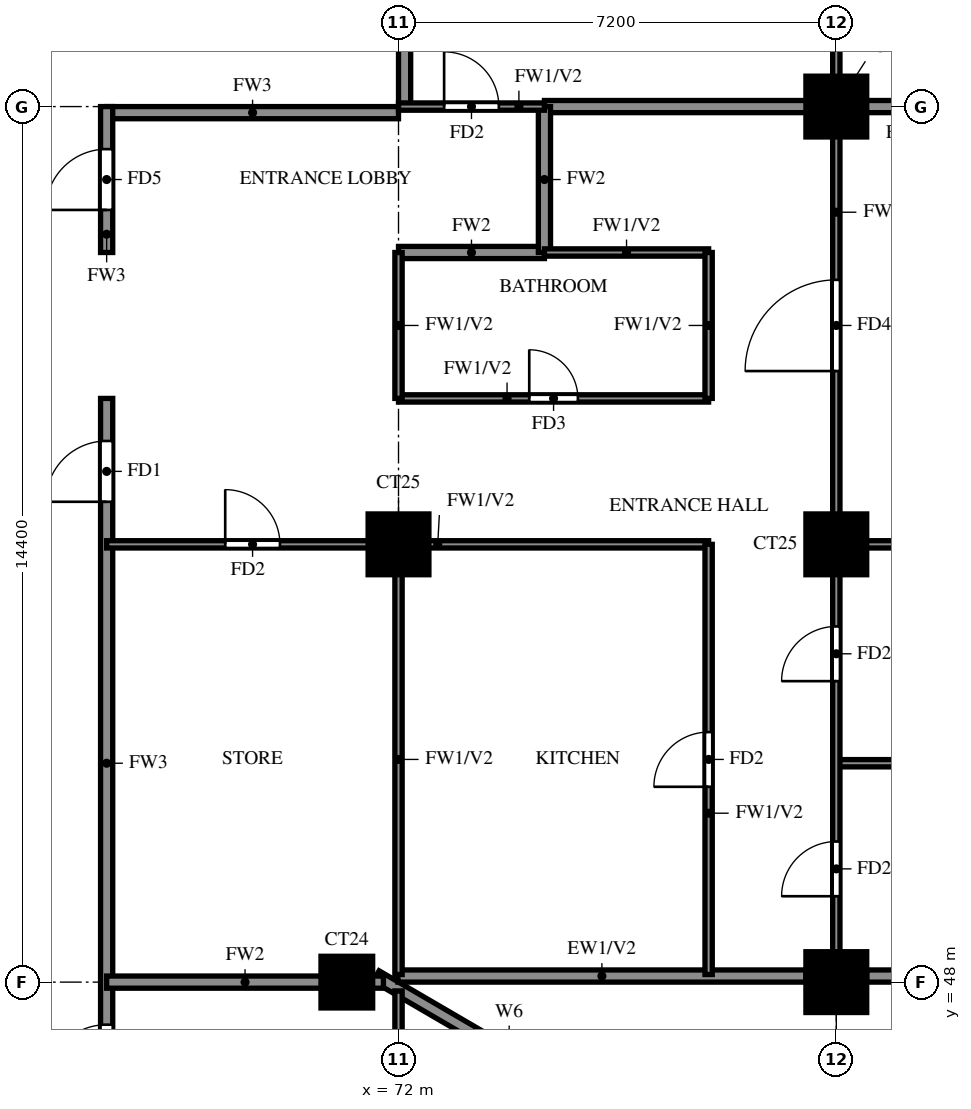
"""IFC4 building model, lengths in metres.
Left out: names, types, materials, properties, quantities, classifications, styles, units other than length and angle.
Written with IfcOpenShell. Run it as: python <this file> out.ifc"""

import sys

from ifc_helpers import new_model, si_unit, direction, frame, frame_2d, origin, origin_2d, place, context, subcontext, project, spatial, rectangle, extrude, source, transform, mapped, element, fill, save


model = new_model("IFC4")
c1 = context("Model", 3, precision=1e-05, world=origin(), true_north=direction((0.0, 1.0)))
c2 = subcontext(c1, "Body", "Model", "MODEL_VIEW")
j1 = project(units=[si_unit("LENGTHUNIT", "METRE"), si_unit("PLANEANGLEUNIT", "RADIAN")], contexts=[c1])
p1 = place(None, origin())
s1 = spatial("IfcSite", under=j1, at=p1, CompositionType="ELEMENT")
p2 = place(p1, origin())
s2 = spatial("IfcBuilding", under=s1, at=p2, CompositionType="ELEMENT")
p3 = place(p2, frame((0.0, 0.0, 160.5)))
s3 = spatial("IfcBuildingStorey", under=s2, at=p3, CompositionType="ELEMENT", Elevation=160.5)
m1 = source(origin(), c2, "Body", "SweptSolid", [
    extrude(rectangle(XDim=0.85, YDim=0.85, at=origin_2d()), origin(), (0.0, 0.0, 1.0), 3.2),
])
p4 = place(p3, frame((71.15, 48.0, 0.0), z_axis=(0.0, 0.0, 1.0), x_axis=(1.0, 0.0, 0.0)))
e1 = element("IfcColumn", 1, at=p4, inside=s3, PredefinedType="COLUMN", context=c2, shape_type="MappedRepresentation", body=[
    mapped(m1, transform((0.0, 0.0, 0.0))),
])
m2 = source(origin(), c2, "Body", "SweptSolid", [
    extrude(rectangle(XDim=1.0, YDim=1.0, at=origin_2d()), origin(), (0.0, 0.0, 1.0), 3.2),
])
for number, where, z_axis, x_axis in (
    (2, (79.2, 48.0, 0.0), (0.0, 0.0, 1.0), (1.0, 0.0, 0.0)),
    (3, (72.0, 55.2, 0.0), (0.0, 0.0, 1.0), (1.0, 0.0, 0.0)),
    (4, (79.2, 55.2, 0.0), (0.0, 0.0, 1.0), (1.0, 0.0, 0.0)),
    (5, (79.2, 62.4, 0.0), (0.0, 0.0, 1.0), (1.0, 0.0, 0.0)),
):
    element("IfcColumn", number, at=place(p3, frame(where, z_axis=z_axis, x_axis=x_axis)), inside=s3, PredefinedType="COLUMN", context=c2, shape_type="MappedRepresentation", body=[
        mapped(m2, transform((0.0, 0.0, 0.0))),
    ])
p5 = place(p3, frame((85.719, 39.881, 0.0), z_axis=(0.0, 0.0, 1.0), x_axis=(-0.86377618652, 0.503875678716, 0.0)))
e6 = element("IfcWall", 6, at=p5, inside=s3, PredefinedType="SOLIDWALL", context=c2, shape_type="SweptSolid", body=[
    extrude(rectangle(XDim=16.311, YDim=0.2, at=frame_2d((8.156, 0.0))), origin(), (0.0, 0.0, 1.0), 3.2),
])
p6 = place(p5, frame((13.326, 0.0, 1.5)))
e7 = element("IfcOpeningElement", 7, at=p6, cuts=e6, PredefinedType="OPENING", context=c2, shape_type="SweptSolid", body=[
    extrude(rectangle(XDim=0.9, YDim=0.9, at=frame_2d((0.45, 0.45))), frame((0.0, 0.11, 0.0), z_axis=(0.0, -1.0, 0.0), x_axis=(1.0, 0.0, 0.0)), (0.0, 0.0, 1.0), 0.22),
])
p7 = place(p3, frame((71.99, 48.1, 0.0), z_axis=(0.0, 0.0, 1.0), x_axis=(1.0, 0.0, 0.0)))
e8 = element("IfcWall", 8, at=p7, inside=s3, PredefinedType="SOLIDWALL", context=c2, shape_type="SweptSolid", body=[
    extrude(rectangle(XDim=6.71, YDim=0.2, at=frame_2d((3.355, 0.0))), origin(), (0.0, 0.0, 1.0), 3.2),
])
p8 = place(p3, frame((79.7, 48.1, 0.0), z_axis=(0.0, 0.0, 1.0), x_axis=(1.0, 0.0, 0.0)))
e9 = element("IfcWall", 9, at=p8, inside=s3, PredefinedType="SOLIDWALL", context=c2, shape_type="SweptSolid", body=[
    extrude(rectangle(XDim=5.675, YDim=0.2, at=frame_2d((2.837, 0.0))), origin(), (0.0, 0.0, 1.0), 3.2),
])
p9 = place(p8, frame((1.637, 0.0, 0.6)))
e10 = element("IfcOpeningElement", 10, at=p9, cuts=e9, PredefinedType="OPENING", context=c2, shape_type="SweptSolid", body=[
    extrude(rectangle(XDim=2.4, YDim=2.4, at=frame_2d((1.2, 1.2))), frame((0.0, 0.11, 0.0), z_axis=(0.0, -1.0, 0.0), x_axis=(1.0, 0.0, 0.0)), (0.0, 0.0, 1.0), 0.22),
])
p10 = place(p3, frame((67.2, 62.3, 0.0), z_axis=(0.0, 0.0, 1.0), x_axis=(1.0, 0.0, 0.0)))
e11 = element("IfcWall", 11, at=p10, inside=s3, PredefinedType="SOLIDWALL", context=c2, shape_type="SweptSolid", body=[
    extrude(rectangle(XDim=4.8, YDim=0.2, at=frame_2d((2.4, 0.0))), origin(), (0.0, 0.0, 1.0), 3.2),
])
p11 = place(p3, frame((67.2, 45.6, 0.0), z_axis=(0.0, 0.0, 1.0), x_axis=(0.0, 1.0, 0.0)))
e12 = element("IfcWall", 12, at=p11, inside=s3, PredefinedType="SOLIDWALL", context=c2, shape_type="SweptSolid", body=[
    extrude(rectangle(XDim=12.0, YDim=0.2, at=frame_2d((6.0, 0.0))), origin(), (0.0, 0.0, 1.0), 3.2),
])
p12 = place(p11, frame((10.3, 0.0, 0.0)))
e13 = element("IfcOpeningElement", 13, at=p12, cuts=e12, PredefinedType="OPENING", context=c2, shape_type="SweptSolid", body=[
    extrude(rectangle(XDim=1.0, YDim=2.1, at=frame_2d((0.5, 1.05))), frame((0.0, 0.11, 0.0), z_axis=(0.0, -1.0, 0.0), x_axis=(1.0, 0.0, 0.0)), (0.0, 0.0, 1.0), 0.22),
])
p13 = place(p11, frame((0.7, 0.0, 0.0)))
e14 = element("IfcOpeningElement", 14, at=p13, cuts=e12, PredefinedType="OPENING", context=c2, shape_type="SweptSolid", body=[
    extrude(rectangle(XDim=1.0, YDim=2.1, at=frame_2d((0.5, 1.05))), frame((0.0, 0.11, 0.0), z_axis=(0.0, -1.0, 0.0), x_axis=(1.0, 0.0, 0.0)), (0.0, 0.0, 1.0), 0.22),
])
p14 = place(p3, frame((67.2, 60.0, 0.0), z_axis=(0.0, 0.0, 1.0), x_axis=(0.0, 1.0, 0.0)))
e15 = element("IfcWall", 15, at=p14, inside=s3, PredefinedType="SOLIDWALL", context=c2, shape_type="SweptSolid", body=[
    extrude(rectangle(XDim=2.4, YDim=0.2, at=frame_2d((1.2, 0.0))), origin(), (0.0, 0.0, 1.0), 3.2),
])
p15 = place(p14, frame((0.7, 0.0, 0.0)))
e16 = element("IfcOpeningElement", 16, at=p15, cuts=e15, PredefinedType="OPENING", context=c2, shape_type="SweptSolid", body=[
    extrude(rectangle(XDim=1.0, YDim=2.1, at=frame_2d((0.5, 1.05))), frame((0.0, 0.11, 0.0), z_axis=(0.0, -1.0, 0.0), x_axis=(1.0, 0.0, 0.0)), (0.0, 0.0, 1.0), 0.22),
])
p16 = place(p3, frame((72.1, 62.4, 0.0), z_axis=(0.0, 0.0, 1.0), x_axis=(0.0, 1.0, 0.0)))
e17 = element("IfcWall", 17, at=p16, inside=s3, PredefinedType="SOLIDWALL", context=c2, shape_type="SweptSolid", body=[
    extrude(rectangle(XDim=15.6, YDim=0.2, at=frame_2d((7.8, 0.0))), origin(), (0.0, 0.0, 1.0), 3.2),
])
p17 = place(p3, frame((67.2, 48.0, 0.0), z_axis=(0.0, 0.0, 1.0), x_axis=(1.0, 0.0, 0.0)))
e18 = element("IfcWall", 18, at=p17, inside=s3, PredefinedType="SOLIDWALL", context=c2, shape_type="SweptSolid", body=[
    extrude(rectangle(XDim=4.552, YDim=0.2, at=frame_2d((2.276, 0.0))), origin(), (0.0, 0.0, 1.0), 3.2),
])
p18 = place(p3, frame((72.0, 60.0, 0.0), z_axis=(0.0, 0.0, 1.0), x_axis=(1.0, 0.0, 0.0)))
e19 = element("IfcWall", 19, at=p18, inside=s3, PredefinedType="SOLIDWALL", context=c2, shape_type="SweptSolid", body=[
    extrude(rectangle(XDim=2.4, YDim=0.2, at=frame_2d((1.2, 0.0))), origin(), (0.0, 0.0, 1.0), 3.2),
])
p19 = place(p3, frame((74.4, 62.4, 0.0), z_axis=(0.0, 0.0, 1.0), x_axis=(1.0, 0.0, 0.0)))
e20 = element("IfcWall", 20, at=p19, inside=s3, PredefinedType="SOLIDWALL", context=c2, shape_type="SweptSolid", body=[
    extrude(rectangle(XDim=11.875, YDim=0.2, at=frame_2d((5.938, 0.0))), origin(), (0.0, 0.0, 1.0), 3.2),
])
p20 = place(p3, frame((74.4, 60.0, 0.0), z_axis=(0.0, 0.0, 1.0), x_axis=(0.0, 1.0, 0.0)))
e21 = element("IfcWall", 21, at=p20, inside=s3, PredefinedType="SOLIDWALL", context=c2, shape_type="SweptSolid", body=[
    extrude(rectangle(XDim=2.4, YDim=0.2, at=frame_2d((1.2, 0.0))), origin(), (0.0, 0.0, 1.0), 3.2),
])
p21 = place(p3, frame((79.2, 51.6, 0.0), z_axis=(0.0, 0.0, 1.0), x_axis=(1.0, 0.0, 0.0)))
e22 = element("IfcWall", 22, at=p21, inside=s3, PredefinedType="PARTITIONING", context=c2, shape_type="SweptSolid", body=[
    extrude(rectangle(XDim=7.075, YDim=0.12, at=frame_2d((3.538, 0.0))), origin(), (0.0, 0.0, 1.0), 2.3),
])
p22 = place(p3, frame((67.2, 55.2, 0.0), z_axis=(0.0, 0.0, 1.0), x_axis=(1.0, 0.0, 0.0)))
e23 = element("IfcWall", 23, at=p22, inside=s3, PredefinedType="PARTITIONING", context=c2, shape_type="SweptSolid", body=[
    extrude(rectangle(XDim=9.9, YDim=0.12, at=frame_2d((4.95, 0.0))), origin(), (0.0, 0.0, 1.0), 3.2),
])
p23 = place(p22, frame((1.95, 0.0, 0.0)))
e24 = element("IfcOpeningElement", 24, at=p23, cuts=e23, PredefinedType="OPENING", context=c2, shape_type="SweptSolid", body=[
    extrude(rectangle(XDim=0.9, YDim=2.1, at=frame_2d((0.45, 1.05))), frame((0.0, 0.07, 0.0), z_axis=(0.0, -1.0, 0.0), x_axis=(1.0, 0.0, 0.0)), (0.0, 0.0, 1.0), 0.14),
])
p24 = place(p3, frame((79.2, 55.2, 0.0), z_axis=(0.0, 0.0, 1.0), x_axis=(1.0, 0.0, 0.0)))
e25 = element("IfcWall", 25, at=p24, inside=s3, PredefinedType="PARTITIONING", context=c2, shape_type="SweptSolid", body=[
    extrude(rectangle(XDim=7.075, YDim=0.12, at=frame_2d((3.538, 0.0))), origin(), (0.0, 0.0, 1.0), 3.2),
])
p25 = place(p3, frame((72.0, 57.6, 0.0), z_axis=(0.0, 0.0, 1.0), x_axis=(1.0, 0.0, 0.0)))
e26 = element("IfcWall", 26, at=p25, inside=s3, PredefinedType="PARTITIONING", context=c2, shape_type="SweptSolid", body=[
    extrude(rectangle(XDim=5.1, YDim=0.12, at=frame_2d((2.55, 0.0))), origin(), (0.0, 0.0, 1.0), 3.2),
])
p26 = place(p25, frame((2.15, 0.0, 0.0)))
e27 = element("IfcOpeningElement", 27, at=p26, cuts=e26, PredefinedType="OPENING", context=c2, shape_type="SweptSolid", body=[
    extrude(rectangle(XDim=0.8, YDim=2.1, at=frame_2d((0.4, 1.05))), frame((0.0, 0.07, 0.0), z_axis=(0.0, -1.0, 0.0), x_axis=(1.0, 0.0, 0.0)), (0.0, 0.0, 1.0), 0.14),
])
p27 = place(p3, frame((74.4, 60.0, 0.0), z_axis=(0.0, 0.0, 1.0), x_axis=(1.0, 0.0, 0.0)))
e28 = element("IfcWall", 28, at=p27, inside=s3, PredefinedType="PARTITIONING", context=c2, shape_type="SweptSolid", body=[
    extrude(rectangle(XDim=2.7, YDim=0.12, at=frame_2d((1.35, 0.0))), origin(), (0.0, 0.0, 1.0), 3.2),
])
p28 = place(p3, frame((72.0, 62.4, 0.0), z_axis=(0.0, 0.0, 1.0), x_axis=(1.0, 0.0, 0.0)))
e29 = element("IfcWall", 29, at=p28, inside=s3, PredefinedType="PARTITIONING", context=c2, shape_type="SweptSolid", body=[
    extrude(rectangle(XDim=2.4, YDim=0.12, at=frame_2d((1.2, 0.0))), origin(), (0.0, 0.0, 1.0), 3.2),
])
p29 = place(p28, frame((0.75, 0.0, 0.0)))
e30 = element("IfcOpeningElement", 30, at=p29, cuts=e29, PredefinedType="OPENING", context=c2, shape_type="SweptSolid", body=[
    extrude(rectangle(XDim=0.9, YDim=2.1, at=frame_2d((0.45, 1.05))), frame((0.0, 0.07, 0.0), z_axis=(0.0, -1.0, 0.0), x_axis=(1.0, 0.0, 0.0)), (0.0, 0.0, 1.0), 0.14),
])
p30 = place(p3, frame((72.0, 39.725, 0.0), z_axis=(0.0, 0.0, 1.0), x_axis=(0.0, 1.0, 0.0)))
e31 = element("IfcWall", 31, at=p30, inside=s3, PredefinedType="PARTITIONING", context=c2, shape_type="SweptSolid", body=[
    extrude(rectangle(XDim=8.13, YDim=0.12, at=frame_2d((4.065, 0.0))), origin(), (0.0, 0.0, 1.0), 2.3),
])
p31 = place(p30, frame((1.788, 0.0, 0.0)))
e32 = element("IfcOpeningElement", 32, at=p31, cuts=e31, PredefinedType="OPENING", context=c2, shape_type="SweptSolid", body=[
    extrude(rectangle(XDim=0.9, YDim=2.1, at=frame_2d((0.45, 1.05))), frame((0.0, 0.07, 0.0), z_axis=(0.0, -1.0, 0.0), x_axis=(1.0, 0.0, 0.0)), (0.0, 0.0, 1.0), 0.14),
])
p32 = place(p30, frame((4.575, 0.0, 0.0)))
e33 = element("IfcOpeningElement", 33, at=p32, cuts=e31, PredefinedType="OPENING", context=c2, shape_type="SweptSolid", body=[
    extrude(rectangle(XDim=0.8, YDim=2.1, at=frame_2d((0.4, 1.05))), frame((0.0, 0.07, 0.0), z_axis=(0.0, -1.0, 0.0), x_axis=(1.0, 0.0, 0.0)), (0.0, 0.0, 1.0), 0.14),
])
p33 = place(p3, frame((72.0, 48.125, 0.0), z_axis=(0.0, 0.0, 1.0), x_axis=(0.0, 1.0, 0.0)))
e34 = element("IfcWall", 34, at=p33, inside=s3, PredefinedType="PARTITIONING", context=c2, shape_type="SweptSolid", body=[
    extrude(rectangle(XDim=7.075, YDim=0.12, at=frame_2d((3.538, 0.0))), origin(), (0.0, 0.0, 1.0), 3.2),
])
p34 = place(p3, frame((72.0, 57.6, 0.0), z_axis=(0.0, 0.0, 1.0), x_axis=(0.0, 1.0, 0.0)))
e35 = element("IfcWall", 35, at=p34, inside=s3, PredefinedType="PARTITIONING", context=c2, shape_type="SweptSolid", body=[
    extrude(rectangle(XDim=2.4, YDim=0.12, at=frame_2d((1.2, 0.0))), origin(), (0.0, 0.0, 1.0), 3.2),
])
p35 = place(p3, frame((77.1, 48.125, 0.0), z_axis=(0.0, 0.0, 1.0), x_axis=(0.0, 1.0, 0.0)))
e36 = element("IfcWall", 36, at=p35, inside=s3, PredefinedType="PARTITIONING", context=c2, shape_type="SweptSolid", body=[
    extrude(rectangle(XDim=7.075, YDim=0.12, at=frame_2d((3.538, 0.0))), origin(), (0.0, 0.0, 1.0), 3.2),
])
p36 = place(p35, frame((3.087, 0.0, 0.0)))
e37 = element("IfcOpeningElement", 37, at=p36, cuts=e36, PredefinedType="OPENING", context=c2, shape_type="SweptSolid", body=[
    extrude(rectangle(XDim=0.9, YDim=2.1, at=frame_2d((0.45, 1.05))), frame((0.0, 0.07, 0.0), z_axis=(0.0, -1.0, 0.0), x_axis=(1.0, 0.0, 0.0)), (0.0, 0.0, 1.0), 0.14),
])
p37 = place(p3, frame((77.1, 57.6, 0.0), z_axis=(0.0, 0.0, 1.0), x_axis=(0.0, 1.0, 0.0)))
e38 = element("IfcWall", 38, at=p37, inside=s3, PredefinedType="PARTITIONING", context=c2, shape_type="SweptSolid", body=[
    extrude(rectangle(XDim=2.4, YDim=0.12, at=frame_2d((1.2, 0.0))), origin(), (0.0, 0.0, 1.0), 3.2),
])
p38 = place(p3, frame((79.2, 48.125, 0.0), z_axis=(0.0, 0.0, 1.0), x_axis=(0.0, 1.0, 0.0)))
e39 = element("IfcWall", 39, at=p38, inside=s3, PredefinedType="PARTITIONING", context=c2, shape_type="SweptSolid", body=[
    extrude(rectangle(XDim=25.075, YDim=0.12, at=frame_2d((12.538, 0.0))), origin(), (0.0, 0.0, 1.0), 3.2),
])
p39 = place(p38, frame((1.288, 0.0, 0.0)))
e40 = element("IfcOpeningElement", 40, at=p39, cuts=e39, PredefinedType="OPENING", context=c2, shape_type="SweptSolid", body=[
    extrude(rectangle(XDim=0.9, YDim=2.1, at=frame_2d((0.45, 1.05))), frame((0.0, 0.07, 0.0), z_axis=(0.0, -1.0, 0.0), x_axis=(1.0, 0.0, 0.0)), (0.0, 0.0, 1.0), 0.14),
])
p40 = place(p38, frame((4.825, 0.0, 0.0)))
e41 = element("IfcOpeningElement", 41, at=p40, cuts=e39, PredefinedType="OPENING", context=c2, shape_type="SweptSolid", body=[
    extrude(rectangle(XDim=0.9, YDim=2.1, at=frame_2d((0.45, 1.05))), frame((0.0, 0.07, 0.0), z_axis=(0.0, -1.0, 0.0), x_axis=(1.0, 0.0, 0.0)), (0.0, 0.0, 1.0), 0.14),
])
p41 = place(p38, frame((9.925, 0.0, 0.0)))
e42 = element("IfcOpeningElement", 42, at=p41, cuts=e39, PredefinedType="OPENING", context=c2, shape_type="SweptSolid", body=[
    extrude(rectangle(XDim=1.5, YDim=2.1, at=frame_2d((0.75, 1.05))), frame((0.0, 0.07, 0.0), z_axis=(0.0, -1.0, 0.0), x_axis=(1.0, 0.0, 0.0)), (0.0, 0.0, 1.0), 0.14),
])
p42 = place(p38, frame((15.625, 0.0, 0.0)))
e43 = element("IfcOpeningElement", 43, at=p42, cuts=e39, PredefinedType="OPENING", context=c2, shape_type="SweptSolid", body=[
    extrude(rectangle(XDim=0.9, YDim=2.1, at=frame_2d((0.45, 1.05))), frame((0.0, 0.07, 0.0), z_axis=(0.0, -1.0, 0.0), x_axis=(1.0, 0.0, 0.0)), (0.0, 0.0, 1.0), 0.14),
])
p43 = place(p38, frame((19.225, 0.0, 0.0)))
e44 = element("IfcOpeningElement", 44, at=p43, cuts=e39, PredefinedType="OPENING", context=c2, shape_type="SweptSolid", body=[
    extrude(rectangle(XDim=0.9, YDim=2.1, at=frame_2d((0.45, 1.05))), frame((0.0, 0.07, 0.0), z_axis=(0.0, -1.0, 0.0), x_axis=(1.0, 0.0, 0.0)), (0.0, 0.0, 1.0), 0.14),
])
p44 = place(p38, frame((22.825, 0.0, 0.0)))
e45 = element("IfcOpeningElement", 45, at=p44, cuts=e39, PredefinedType="OPENING", context=c2, shape_type="SweptSolid", body=[
    extrude(rectangle(XDim=0.9, YDim=2.1, at=frame_2d((0.45, 1.05))), frame((0.0, 0.07, 0.0), z_axis=(0.0, -1.0, 0.0), x_axis=(1.0, 0.0, 0.0)), (0.0, 0.0, 1.0), 0.14),
])
p45 = place(p12, origin())
e46 = element("IfcDoor", 46, at=p45, inside=s3, OperationType="SINGLE_SWING_LEFT", PredefinedType="DOOR", context=c2, shape_type="SweptSolid", body=[
    extrude(rectangle(XDim=1.0, YDim=2.1, at=frame_2d((0.5, 1.05))), frame((0.0, 0.025, 0.0), z_axis=(0.0, -1.0, 0.0), x_axis=(1.0, 0.0, 0.0)), (0.0, 0.0, 1.0), 0.05),
])
fill(e13, e46)
p46 = place(p39, origin())
e47 = element("IfcDoor", 47, at=p46, inside=s3, OperationType="SINGLE_SWING_LEFT", PredefinedType="DOOR", context=c2, shape_type="SweptSolid", body=[
    extrude(rectangle(XDim=0.9, YDim=2.1, at=frame_2d((0.45, 1.05))), frame((0.0, 0.025, 0.0), z_axis=(0.0, -1.0, 0.0), x_axis=(1.0, 0.0, 0.0)), (0.0, 0.0, 1.0), 0.05),
])
fill(e40, e47)
p47 = place(p40, origin())
e48 = element("IfcDoor", 48, at=p47, inside=s3, OperationType="SINGLE_SWING_RIGHT", PredefinedType="DOOR", context=c2, shape_type="SweptSolid", body=[
    extrude(rectangle(XDim=0.9, YDim=2.1, at=frame_2d((0.45, 1.05))), frame((0.0, 0.025, 0.0), z_axis=(0.0, -1.0, 0.0), x_axis=(1.0, 0.0, 0.0)), (0.0, 0.0, 1.0), 0.05),
])
fill(e41, e48)
p48 = place(p41, origin())
e49 = element("IfcDoor", 49, at=p48, inside=s3, OperationType="SINGLE_SWING_LEFT", PredefinedType="DOOR", context=c2, shape_type="SweptSolid", body=[
    extrude(rectangle(XDim=1.5, YDim=2.1, at=frame_2d((0.75, 1.05))), frame((0.0, 0.025, 0.0), z_axis=(0.0, -1.0, 0.0), x_axis=(1.0, 0.0, 0.0)), (0.0, 0.0, 1.0), 0.05),
])
fill(e42, e49)
p49 = place(p36, origin())
e50 = element("IfcDoor", 50, at=p49, inside=s3, OperationType="SINGLE_SWING_LEFT", PredefinedType="DOOR", context=c2, shape_type="SweptSolid", body=[
    extrude(rectangle(XDim=0.9, YDim=2.1, at=frame_2d((0.45, 1.05))), frame((0.0, 0.025, 0.0), z_axis=(0.0, -1.0, 0.0), x_axis=(1.0, 0.0, 0.0)), (0.0, 0.0, 1.0), 0.05),
])
fill(e37, e50)
p50 = place(p26, origin())
e51 = element("IfcDoor", 51, at=p50, inside=s3, OperationType="SINGLE_SWING_RIGHT", PredefinedType="DOOR", context=c2, shape_type="SweptSolid", body=[
    extrude(rectangle(XDim=0.8, YDim=2.1, at=frame_2d((0.4, 1.05))), frame((0.0, 0.025, 0.0), z_axis=(0.0, -1.0, 0.0), x_axis=(1.0, 0.0, 0.0)), (0.0, 0.0, 1.0), 0.05),
])
fill(e27, e51)
p51 = place(p23, origin())
e52 = element("IfcDoor", 52, at=p51, inside=s3, OperationType="SINGLE_SWING_LEFT", PredefinedType="DOOR", context=c2, shape_type="SweptSolid", body=[
    extrude(rectangle(XDim=0.9, YDim=2.1, at=frame_2d((0.45, 1.05))), frame((0.0, 0.025, 0.0), z_axis=(0.0, -1.0, 0.0), x_axis=(1.0, 0.0, 0.0)), (0.0, 0.0, 1.0), 0.05),
])
fill(e24, e52)
p52 = place(p29, origin())
e53 = element("IfcDoor", 53, at=p52, inside=s3, OperationType="SINGLE_SWING_RIGHT", PredefinedType="DOOR", context=c2, shape_type="SweptSolid", body=[
    extrude(rectangle(XDim=0.9, YDim=2.1, at=frame_2d((0.45, 1.05))), frame((0.0, 0.025, 0.0), z_axis=(0.0, -1.0, 0.0), x_axis=(1.0, 0.0, 0.0)), (0.0, 0.0, 1.0), 0.05),
])
fill(e30, e53)
p53 = place(p15, origin())
e54 = element("IfcDoor", 54, at=p53, inside=s3, OperationType="SINGLE_SWING_LEFT", PredefinedType="DOOR", context=c2, shape_type="SweptSolid", body=[
    extrude(rectangle(XDim=1.0, YDim=2.1, at=frame_2d((0.5, 1.05))), frame((0.0, 0.025, 0.0), z_axis=(0.0, -1.0, 0.0), x_axis=(1.0, 0.0, 0.0)), (0.0, 0.0, 1.0), 0.05),
])
fill(e16, e54)
p54 = place(p13, origin())
e55 = element("IfcDoor", 55, at=p54, inside=s3, OperationType="SINGLE_SWING_LEFT", PredefinedType="DOOR", context=c2, shape_type="SweptSolid", body=[
    extrude(rectangle(XDim=1.0, YDim=2.1, at=frame_2d((0.5, 1.05))), frame((0.0, 0.025, 0.0), z_axis=(0.0, -1.0, 0.0), x_axis=(1.0, 0.0, 0.0)), (0.0, 0.0, 1.0), 0.05),
])
fill(e14, e55)
save(model, sys.argv[1])
